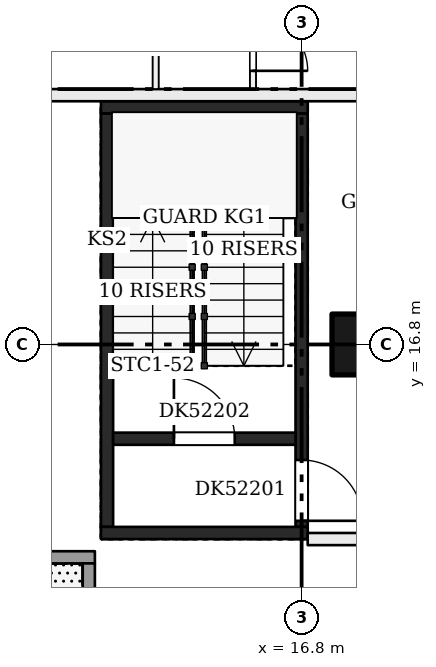
"""IFC4 building model, lengths in metres.
Left out: names, types, materials, properties, quantities, classifications, styles, units other than length and angle.
Written with IfcOpenShell. Run it as: python <this file> out.ifc"""

import sys

from ifc_helpers import new_model, si_unit, direction, frame, frame_2d, origin, origin_2d, place, context, subcontext, project, spatial, rectangle, extrude, element, fill, save


model = new_model("IFC4")
c1 = context("Model", 3, precision=1e-05, world=origin(), true_north=direction((0.0, 1.0)))
c2 = subcontext(c1, "Body", "Model", "MODEL_VIEW")
j1 = project(units=[si_unit("LENGTHUNIT", "METRE"), si_unit("PLANEANGLEUNIT", "RADIAN")], contexts=[c1])
p1 = place(None, origin())
s1 = spatial("IfcSite", under=j1, at=p1, CompositionType="ELEMENT")
p2 = place(p1, origin())
s2 = spatial("IfcBuilding", under=s1, at=p2, CompositionType="ELEMENT")
p3 = place(p2, frame((0.0, 0.0, 200.2)))
s3 = spatial("IfcBuildingStorey", under=s2, at=p3, CompositionType="ELEMENT", Elevation=200.2)
p4 = place(p3, frame((17.8, 16.8, 0.0), z_axis=(0.0, 0.0, 1.0), x_axis=(1.0, 0.0, 0.0)))
e1 = element("IfcColumn", 1, at=p4, inside=s3, PredefinedType="COLUMN", context=c2, shape_type="SweptSolid", body=[
    extrude(rectangle(XDim=1.0, YDim=1.0, at=origin_2d()), origin(), (0.0, 0.0, 1.0), 3.22),
])
p5 = place(p3, frame((13.6, 13.8, 0.0), z_axis=(0.0, 0.0, 1.0), x_axis=(0.0, 1.0, 0.0)))
e2 = element("IfcWall", 2, at=p5, inside=s3, PredefinedType="SHEAR", context=c2, shape_type="SweptSolid", body=[
    extrude(rectangle(XDim=6.8, YDim=0.2, at=frame_2d((3.4, 0.0))), origin(), (0.0, 0.0, 1.0), 3.22),
])
p6 = place(p3, frame((16.8, 13.8, 0.0), z_axis=(0.0, 0.0, 1.0), x_axis=(0.0, 1.0, 0.0)))
e3 = element("IfcWall", 3, at=p6, inside=s3, PredefinedType="SHEAR", context=c2, shape_type="SweptSolid", body=[
    extrude(rectangle(XDim=6.8, YDim=0.2, at=frame_2d((3.4, 0.0))), origin(), (0.0, 0.0, 1.0), 3.22),
])
p7 = place(p6, frame((0.1, 0.0, 0.0)))
e4 = element("IfcOpeningElement", 4, at=p7, cuts=e3, PredefinedType="OPENING", context=c2, shape_type="SweptSolid", body=[
    extrude(rectangle(XDim=1.0, YDim=2.1, at=frame_2d((0.5, 1.05))), frame((0.0, 0.11, 0.0), z_axis=(0.0, -1.0, 0.0), x_axis=(1.0, 0.0, 0.0)), (0.0, 0.0, 1.0), 0.22),
])
for number, where, z_axis, x_axis in (
    (5, (13.5, 13.7, 0.0), (0.0, 0.0, 1.0), (1.0, 0.0, 0.0)),
    (6, (13.5, 20.7, 0.0), (0.0, 0.0, 1.0), (1.0, 0.0, 0.0)),
):
    element("IfcWall", number, at=place(p3, frame(where, z_axis=z_axis, x_axis=x_axis)), inside=s3, PredefinedType="SHEAR", context=c2, shape_type="SweptSolid", body=[
        extrude(rectangle(XDim=3.4, YDim=0.2, at=frame_2d((1.7, 0.0))), origin(), (0.0, 0.0, 1.0), 3.22),
    ])
p8 = place(p3, frame((13.7, 15.25, 0.0), z_axis=(0.0, 0.0, 1.0), x_axis=(1.0, 0.0, 0.0)))
e7 = element("IfcWall", 7, at=p8, inside=s3, PredefinedType="SHEAR", context=c2, shape_type="SweptSolid", body=[
    extrude(rectangle(XDim=3.0, YDim=0.2, at=frame_2d((1.5, 0.0))), origin(), (0.0, 0.0, 1.0), 3.22),
])
p9 = place(p8, frame((1.0, 0.0, 0.0)))
e8 = element("IfcOpeningElement", 8, at=p9, cuts=e7, PredefinedType="OPENING", context=c2, shape_type="SweptSolid", body=[
    extrude(rectangle(XDim=1.0, YDim=2.1, at=frame_2d((0.5, 1.05))), frame((0.0, 0.11, 0.0), z_axis=(0.0, -1.0, 0.0), x_axis=(1.0, 0.0, 0.0)), (0.0, 0.0, 1.0), 0.22),
])
p10 = place(p3, frame((16.9, 13.6, 0.0), z_axis=(0.0, 0.0, 1.0), x_axis=(1.0, 0.0, 0.0)))
e9 = element("IfcWall", 9, at=p10, inside=s3, PredefinedType="PARTITIONING", context=c2, shape_type="SweptSolid", body=[
    extrude(rectangle(XDim=4.2, YDim=0.2, at=frame_2d((2.1, 0.0))), origin(), (0.0, 0.0, 1.0), 3.22),
])
p11 = place(p10, frame((1.6, 0.0, 0.0)))
e10 = element("IfcOpeningElement", 10, at=p11, cuts=e9, PredefinedType="OPENING", context=c2, shape_type="SweptSolid", body=[
    extrude(rectangle(XDim=1.0, YDim=2.1, at=frame_2d((0.5, 1.05))), frame((0.0, 0.11, 0.0), z_axis=(0.0, -1.0, 0.0), x_axis=(1.0, 0.0, 0.0)), (0.0, 0.0, 1.0), 0.22),
])
p12 = place(p3, frame((10.9, 20.9, 0.0), z_axis=(0.0, 0.0, 1.0), x_axis=(1.0, 0.0, 0.0)))
e11 = element("IfcWall", 11, at=p12, inside=s3, PredefinedType="PARTITIONING", context=c2, shape_type="SweptSolid", body=[
    extrude(rectangle(XDim=8.3, YDim=0.2, at=frame_2d((4.15, 0.0))), origin(), (0.0, 0.0, 1.0), 3.22),
])
p13 = place(p3, frame((14.4, 21.0, 0.0), z_axis=(0.0, 0.0, 1.0), x_axis=(0.0, 1.0, 0.0)))
e12 = element("IfcWall", 12, at=p13, inside=s3, PredefinedType="PARTITIONING", context=c2, shape_type="SweptSolid", body=[
    extrude(rectangle(XDim=19.0, YDim=0.1, at=frame_2d((9.5, 0.0))), origin(), (0.0, 0.0, 1.0), 3.22),
])
p14 = place(p13, frame((3.7, 0.0, 0.0)))
e13 = element("IfcOpeningElement", 13, at=p14, cuts=e12, PredefinedType="OPENING", context=c2, shape_type="SweptSolid", body=[
    extrude(rectangle(XDim=0.9, YDim=2.1, at=frame_2d((0.45, 1.05))), frame((0.0, 0.06, 0.0), z_axis=(0.0, -1.0, 0.0), x_axis=(1.0, 0.0, 0.0)), (0.0, 0.0, 1.0), 0.12),
])
p15 = place(p13, frame((10.0, 0.0, 0.0)))
e14 = element("IfcOpeningElement", 14, at=p15, cuts=e12, PredefinedType="OPENING", context=c2, shape_type="SweptSolid", body=[
    extrude(rectangle(XDim=0.9, YDim=2.1, at=frame_2d((0.45, 1.05))), frame((0.0, 0.06, 0.0), z_axis=(0.0, -1.0, 0.0), x_axis=(1.0, 0.0, 0.0)), (0.0, 0.0, 1.0), 0.12),
])
p16 = place(p13, frame((15.4, 0.0, 0.0)))
e15 = element("IfcOpeningElement", 15, at=p16, cuts=e12, PredefinedType="OPENING", context=c2, shape_type="SweptSolid", body=[
    extrude(rectangle(XDim=0.9, YDim=2.1, at=frame_2d((0.45, 1.05))), frame((0.0, 0.06, 0.0), z_axis=(0.0, -1.0, 0.0), x_axis=(1.0, 0.0, 0.0)), (0.0, 0.0, 1.0), 0.12),
])
p17 = place(p3, frame((16.0, 21.0, 0.0), z_axis=(0.0, 0.0, 1.0), x_axis=(0.0, 1.0, 0.0)))
e16 = element("IfcWall", 16, at=p17, inside=s3, PredefinedType="PARTITIONING", context=c2, shape_type="SweptSolid", body=[
    extrude(rectangle(XDim=19.0, YDim=0.1, at=frame_2d((9.5, 0.0))), origin(), (0.0, 0.0, 1.0), 3.22),
])
p18 = place(p17, frame((2.6, 0.0, 0.0)))
e17 = element("IfcOpeningElement", 17, at=p18, cuts=e16, PredefinedType="OPENING", context=c2, shape_type="SweptSolid", body=[
    extrude(rectangle(XDim=0.9, YDim=2.1, at=frame_2d((0.45, 1.05))), frame((0.0, 0.06, 0.0), z_axis=(0.0, -1.0, 0.0), x_axis=(1.0, 0.0, 0.0)), (0.0, 0.0, 1.0), 0.12),
])
p19 = place(p17, frame((0.3, 0.0, 0.0)))
e18 = element("IfcOpeningElement", 18, at=p19, cuts=e16, PredefinedType="OPENING", context=c2, shape_type="SweptSolid", body=[
    extrude(rectangle(XDim=0.9, YDim=2.1, at=frame_2d((0.45, 1.05))), frame((0.0, 0.06, 0.0), z_axis=(0.0, -1.0, 0.0), x_axis=(1.0, 0.0, 0.0)), (0.0, 0.0, 1.0), 0.12),
])
p20 = place(p17, frame((8.0, 0.0, 0.0)))
e19 = element("IfcOpeningElement", 19, at=p20, cuts=e16, PredefinedType="OPENING", context=c2, shape_type="SweptSolid", body=[
    extrude(rectangle(XDim=0.9, YDim=2.1, at=frame_2d((0.45, 1.05))), frame((0.0, 0.06, 0.0), z_axis=(0.0, -1.0, 0.0), x_axis=(1.0, 0.0, 0.0)), (0.0, 0.0, 1.0), 0.12),
])
p21 = place(p17, frame((13.3, 0.0, 0.0)))
e20 = element("IfcOpeningElement", 20, at=p21, cuts=e16, PredefinedType="OPENING", context=c2, shape_type="SweptSolid", body=[
    extrude(rectangle(XDim=0.9, YDim=2.1, at=frame_2d((0.45, 1.05))), frame((0.0, 0.06, 0.0), z_axis=(0.0, -1.0, 0.0), x_axis=(1.0, 0.0, 0.0)), (0.0, 0.0, 1.0), 0.12),
])
p22 = place(p17, frame((16.4, 0.0, 0.0)))
e21 = element("IfcOpeningElement", 21, at=p22, cuts=e16, PredefinedType="OPENING", context=c2, shape_type="SweptSolid", body=[
    extrude(rectangle(XDim=0.9, YDim=2.1, at=frame_2d((0.45, 1.05))), frame((0.0, 0.06, 0.0), z_axis=(0.0, -1.0, 0.0), x_axis=(1.0, 0.0, 0.0)), (0.0, 0.0, 1.0), 0.12),
])
p23 = place(p3, frame((10.8, 13.3, 0.0), z_axis=(0.0, 0.0, 1.0), x_axis=(1.0, 0.0, 0.0)))
e22 = element("IfcWall", 22, at=p23, inside=s3, PredefinedType="SOLIDWALL", context=c2, shape_type="SweptSolid", body=[
    extrude(rectangle(XDim=2.6, YDim=0.2, at=frame_2d((1.3, 0.0))), origin(), (0.0, 0.0, 1.0), 3.22),
])
p24 = place(p3, frame((13.3, 13.2, 0.0), z_axis=(0.0, 0.0, 1.0), x_axis=(0.0, -1.0, 0.0)))
e23 = element("IfcWall", 23, at=p24, inside=s3, PredefinedType="SOLIDWALL", context=c2, shape_type="SweptSolid", body=[
    extrude(rectangle(XDim=2.2, YDim=0.2, at=frame_2d((1.1, 0.0))), origin(), (0.0, 0.0, 1.0), 3.22),
])
p25 = place(p7, frame((1.0, 0.0, 0.0), z_axis=(0.0, 0.0, 1.0), x_axis=(-1.0, 0.0, 0.0)))
e24 = element("IfcDoor", 24, at=p25, inside=s3, OperationType="SINGLE_SWING_RIGHT", PredefinedType="DOOR", context=c2, shape_type="SweptSolid", body=[
    extrude(rectangle(XDim=1.0, YDim=2.1, at=frame_2d((0.5, 1.05))), frame((0.0, 0.025, 0.0), z_axis=(0.0, -1.0, 0.0), x_axis=(1.0, 0.0, 0.0)), (0.0, 0.0, 1.0), 0.05),
])
fill(e4, e24)
p26 = place(p9, origin())
e25 = element("IfcDoor", 25, at=p26, inside=s3, OperationType="SINGLE_SWING_LEFT", PredefinedType="DOOR", context=c2, shape_type="SweptSolid", body=[
    extrude(rectangle(XDim=1.0, YDim=2.1, at=frame_2d((0.5, 1.05))), frame((0.0, 0.025, 0.0), z_axis=(0.0, -1.0, 0.0), x_axis=(1.0, 0.0, 0.0)), (0.0, 0.0, 1.0), 0.05),
])
fill(e8, e25)
p27 = place(p19, frame((0.9, 0.0, 0.0), z_axis=(0.0, 0.0, 1.0), x_axis=(-1.0, 0.0, 0.0)))
e26 = element("IfcDoor", 26, at=p27, inside=s3, OperationType="SINGLE_SWING_RIGHT", PredefinedType="DOOR", context=c2, shape_type="SweptSolid", body=[
    extrude(rectangle(XDim=0.9, YDim=2.1, at=frame_2d((0.45, 1.05))), frame((0.0, 0.025, 0.0), z_axis=(0.0, -1.0, 0.0), x_axis=(1.0, 0.0, 0.0)), (0.0, 0.0, 1.0), 0.05),
])
fill(e18, e26)
save(model, sys.argv[1])
